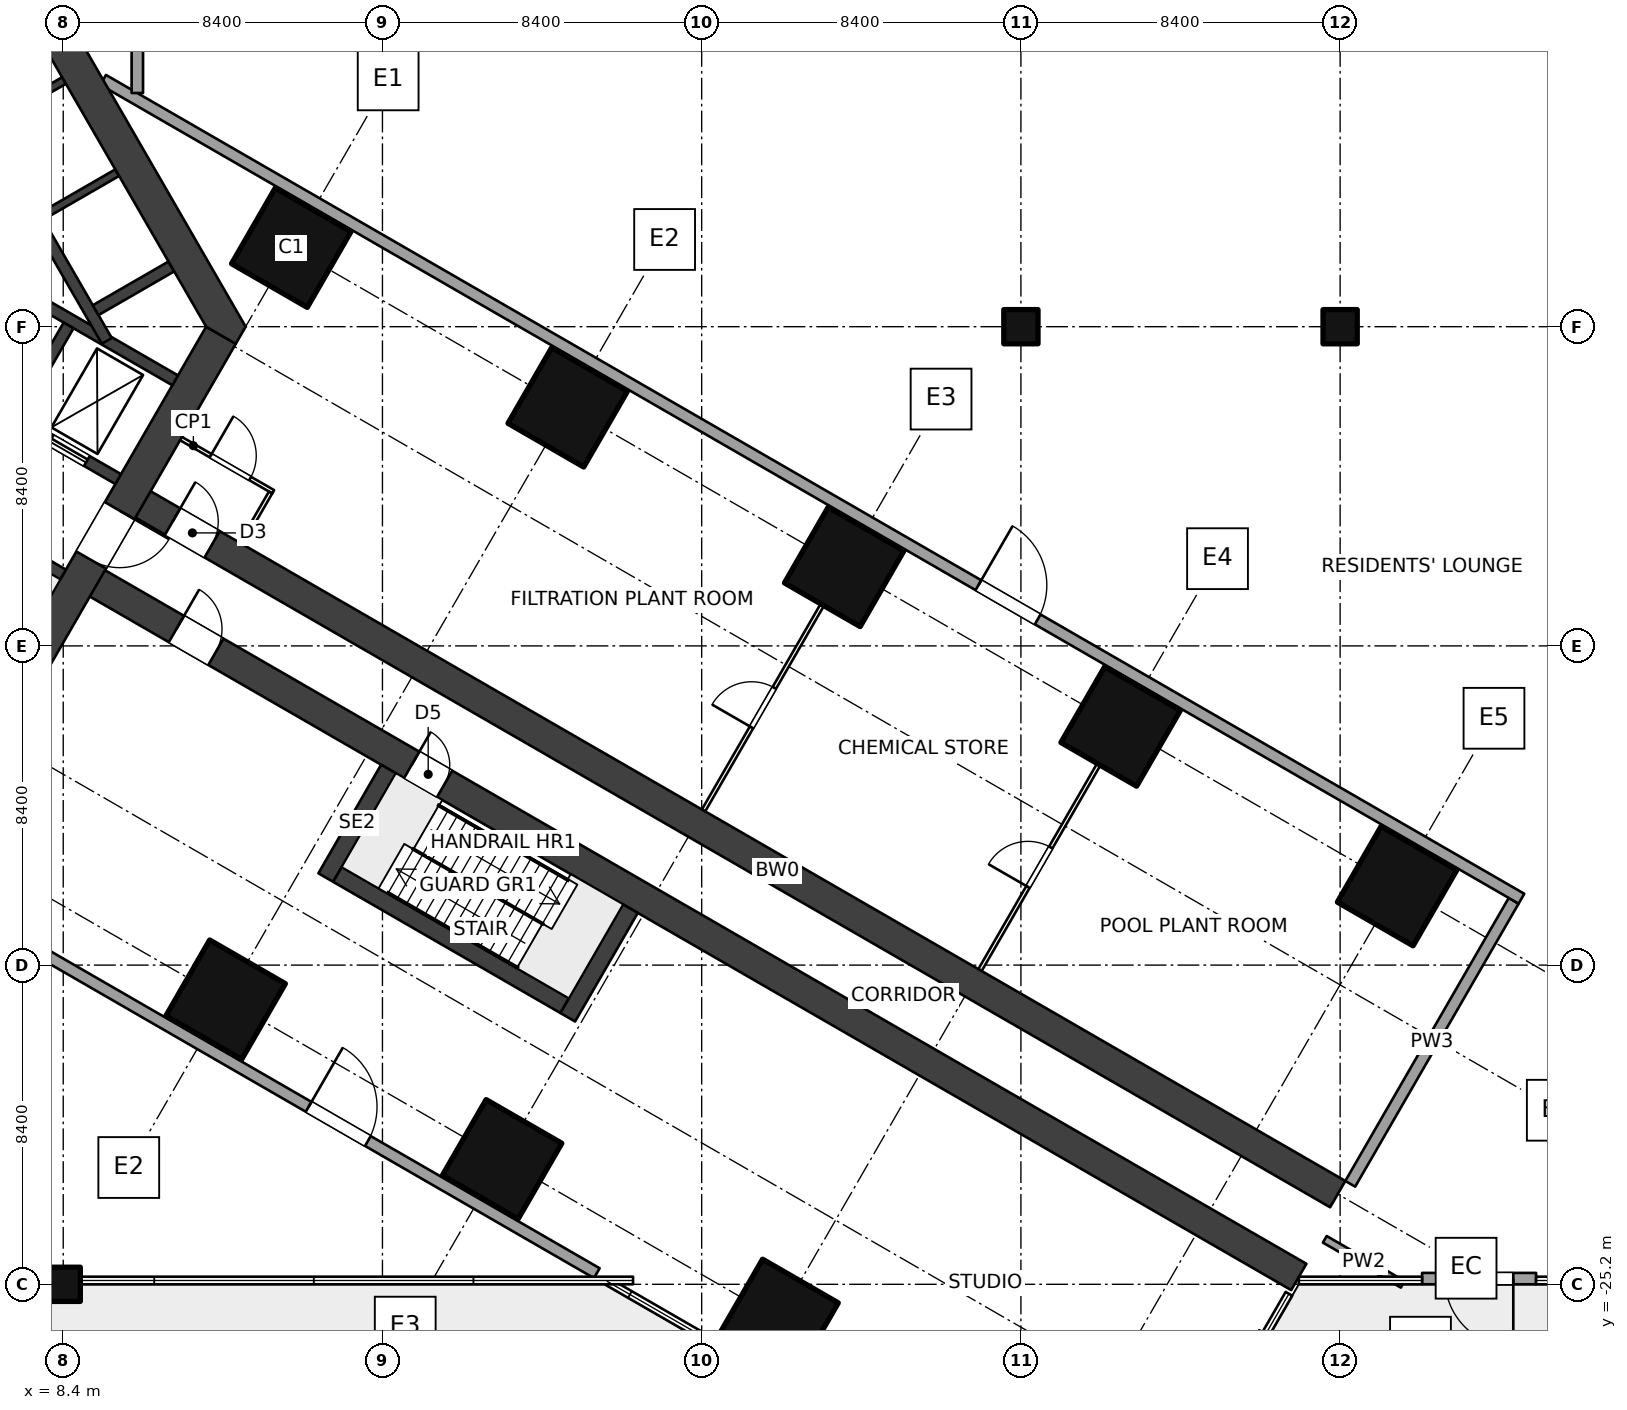
"""IFC4 building model, lengths in metres.
Left out: names, types, materials, properties, quantities, classifications, styles, units other than length and angle.
Written with IfcOpenShell. Run it as: python <this file> out.ifc"""

import sys

from ifc_helpers import new_model, si_unit, direction, frame, frame_2d, origin, origin_2d, place, context, subcontext, project, spatial, polyline, rectangle, outline, extrude, element, fill, save


model = new_model("IFC4")
c1 = context("Model", 3, precision=1e-05, world=origin(), true_north=direction((0.0, 1.0)))
c2 = subcontext(c1, "Body", "Model", "MODEL_VIEW")
j1 = project(units=[si_unit("LENGTHUNIT", "METRE"), si_unit("PLANEANGLEUNIT", "RADIAN")], contexts=[c1])
p1 = place(None, origin())
s1 = spatial("IfcSite", under=j1, at=p1, CompositionType="ELEMENT")
p2 = place(p1, origin())
s2 = spatial("IfcBuilding", under=s1, at=p2, CompositionType="ELEMENT")
p3 = place(p2, frame((0.0, 0.0, 11.0)))
s3 = spatial("IfcBuildingStorey", under=s2, at=p3, CompositionType="ELEMENT", Elevation=11.0)
for number, where, z_axis, x_axis in (
    (1, (14.4, 2.078, 0.0), (0.0, 0.0, 1.0), (-0.5, -0.866, 0.0)),
    (2, (21.675, -2.122, 0.0), (0.0, 0.0, 1.0), (-0.5, -0.866, 0.0)),
    (3, (12.675, -17.71, 0.0), (0.0, 0.0, 1.0), (-0.5, -0.866, 0.0)),
    (4, (28.949, -6.322, 0.0), (0.0, 0.0, 1.0), (-0.5, -0.866, 0.0)),
    (5, (19.949, -21.91, 0.0), (0.0, 0.0, 1.0), (-0.5, -0.866, 0.0)),
    (6, (36.224, -10.521, 0.0), (0.0, 0.0, 1.0), (-0.5, -0.866, 0.0)),
    (7, (27.224, -26.11, 0.0), (0.0, 0.0, 1.0), (-0.5, -0.866, 0.0)),
    (8, (43.499, -14.721, 0.0), (0.0, 0.0, 1.0), (-0.5, -0.866, 0.0)),
):
    element("IfcColumn", number, at=place(p3, frame(where, z_axis=z_axis, x_axis=x_axis)), inside=s3, PredefinedType="COLUMN", context=c2, shape_type="SweptSolid", body=[
        extrude(rectangle(XDim=2.3, YDim=2.3, at=origin_2d()), origin(), (0.0, 0.0, 1.0), 5.0),
    ])
for number, where, z_axis, x_axis in (
    (9, (8.4, -25.2, 0.0), (0.0, 0.0, 1.0), (1.0, 0.0, 0.0)),
    (10, (33.6, 0.0, 0.0), (0.0, 0.0, 1.0), (1.0, 0.0, 0.0)),
    (11, (42.0, 0.0, 0.0), (0.0, 0.0, 1.0), (1.0, 0.0, 0.0)),
):
    element("IfcColumn", number, at=place(p3, frame(where, z_axis=z_axis, x_axis=x_axis)), inside=s3, PredefinedType="COLUMN", context=c2, shape_type="SweptSolid", body=[
        extrude(rectangle(XDim=0.9, YDim=0.9, at=origin_2d()), origin(), (0.0, 0.0, 1.0), 5.0),
    ])
p4 = place(p3, frame((12.551, -0.225, 0.0), z_axis=(0.0, 0.0, 1.0), x_axis=(-0.499997612506, -0.8660267822, 0.0)))
e12 = element("IfcWall", 12, at=p4, inside=s3, PredefinedType="SHEAR", context=c2, shape_type="SweptSolid", body=[
    extrude(rectangle(XDim=12.161, YDim=0.9, at=frame_2d((6.08, 0.0))), origin(), (0.0, 0.0, 1.0), 5.0),
])
p5 = place(p4, frame((5.33, 0.0, 0.0)))
e13 = element("IfcOpeningElement", 13, at=p5, cuts=e12, PredefinedType="OPENING", context=c2, shape_type="SweptSolid", body=[
    extrude(rectangle(XDim=1.5, YDim=2.1, at=frame_2d((0.75, 1.05))), frame((0.0, 0.46, 0.0), z_axis=(0.0, -1.0, 0.0), x_axis=(1.0, 0.0, 0.0)), (0.0, 0.0, 1.0), 0.92),
])
p6 = place(p3, origin())
e14 = element("IfcWall", 14, at=p6, inside=s3, PredefinedType="SHEAR", context=c2, shape_type="SweptSolid", body=[
    extrude(outline(polyline([(13.2, 0.0), (6.6, 11.432), (6.08, 11.432), (6.08, 10.531), (12.161, 0.0), (12.94, -0.45), (13.2, 0.0)])), origin(), (0.0, 0.0, 1.0), 5.0),
])
p7 = place(p3, frame((2.419, -3.071, 0.0), z_axis=(0.0, 0.0, 1.0), x_axis=(0.86602711848, -0.499997030048, 0.0)))
e15 = element("IfcWall", 15, at=p7, inside=s3, PredefinedType="SHEAR", context=c2, shape_type="SweptSolid", body=[
    extrude(rectangle(XDim=6.901, YDim=0.3, at=frame_2d((3.451, 0.0))), origin(), (0.0, 0.0, 1.0), 5.0),
])
p8 = place(p7, frame((0.25, 0.0, 0.0)))
e16 = element("IfcOpeningElement", 16, at=p8, cuts=e15, PredefinedType="OPENING", context=c2, shape_type="SweptSolid", body=[
    extrude(rectangle(XDim=1.0, YDim=2.1, at=frame_2d((0.5, 1.05))), frame((0.0, 0.16, 0.0), z_axis=(0.0, -1.0, 0.0), x_axis=(1.0, 0.0, 0.0)), (0.0, 0.0, 1.0), 0.32),
])
p9 = place(p3, frame((3.869, -0.559, 0.0), z_axis=(0.0, 0.0, 1.0), x_axis=(0.86602711848, -0.499997030048, 0.0)))
e17 = element("IfcWall", 17, at=p9, inside=s3, PredefinedType="SHEAR", context=c2, shape_type="SweptSolid", body=[
    extrude(rectangle(XDim=6.901, YDim=0.3, at=frame_2d((3.451, 0.0))), origin(), (0.0, 0.0, 1.0), 5.0),
])
p10 = place(p9, frame((4.85, 0.0, 0.0)))
e18 = element("IfcOpeningElement", 18, at=p10, cuts=e17, PredefinedType="OPENING", context=c2, shape_type="SweptSolid", body=[
    extrude(rectangle(XDim=1.1, YDim=2.1, at=frame_2d((0.55, 1.05))), frame((0.0, 0.16, 0.0), z_axis=(0.0, -1.0, 0.0), x_axis=(1.0, 0.0, 0.0)), (0.0, 0.0, 1.0), 0.32),
])
p11 = place(p3, frame((5.369, 2.039, 0.0), z_axis=(0.0, 0.0, 1.0), x_axis=(0.86602711848, -0.499997030048, 0.0)))
e19 = element("IfcWall", 19, at=p11, inside=s3, PredefinedType="SHEAR", context=c2, shape_type="SweptSolid", body=[
    extrude(rectangle(XDim=6.901, YDim=0.3, at=frame_2d((3.451, 0.0))), origin(), (0.0, 0.0, 1.0), 5.0),
])
p12 = place(p3, frame((8.541, 0.034, 0.0), z_axis=(0.0, 0.0, 1.0), x_axis=(-0.50000943426, -0.866019956843, 0.0)))
e20 = element("IfcWall", 20, at=p12, inside=s3, PredefinedType="SHEAR", context=c2, shape_type="SweptSolid", body=[
    extrude(rectangle(XDim=2.7, YDim=0.3, at=frame_2d((1.35, 0.0))), origin(), (0.0, 0.0, 1.0), 5.0),
])
p13 = place(p3, frame((4.45, 8.455, 0.0), z_axis=(0.0, 0.0, 1.0), x_axis=(0.500002290144, -0.866024081565, 0.0)))
e21 = element("IfcWall", 21, at=p13, inside=s3, PredefinedType="SHEAR", context=c2, shape_type="SweptSolid", body=[
    extrude(rectangle(XDim=10.195, YDim=0.3, at=frame_2d((5.098, 0.0))), origin(), (0.0, 0.0, 1.0), 5.0),
])
p14 = place(p3, frame((9.254, 0.435, 0.0), z_axis=(0.0, 0.0, 1.0), x_axis=(0.866007057882, 0.500031774688, 0.0)))
e22 = element("IfcWall", 22, at=p14, inside=s3, PredefinedType="SHEAR", context=c2, shape_type="SweptSolid", body=[
    extrude(rectangle(XDim=2.3, YDim=0.3, at=frame_2d((1.15, 0.0))), origin(), (0.0, 0.0, 1.0), 5.0),
])
for number, where, z_axis, x_axis in (
    (23, (6.429, 5.328, 0.0), (0.0, 0.0, 1.0), (0.866, 0.5, 0.0)),
    (24, (7.829, 2.903, 0.0), (0.0, 0.0, 1.0), (0.866, 0.5, 0.0)),
):
    element("IfcWall", number, at=place(p3, frame(where, z_axis=z_axis, x_axis=x_axis)), inside=s3, PredefinedType="SHEAR", context=c2, shape_type="SweptSolid", body=[
        extrude(rectangle(XDim=2.3, YDim=0.2, at=frame_2d((1.15, 0.0))), origin(), (0.0, 0.0, 1.0), 5.0),
    ])
p15 = place(p3, frame((10.11, -4.451, 0.0), z_axis=(0.0, 0.0, 1.0), x_axis=(0.866025284237, -0.500000207062, 0.0)))
e25 = element("IfcWall", 25, at=p15, inside=s3, PredefinedType="SHEAR", context=c2, shape_type="SweptSolid", body=[
    extrude(rectangle(XDim=36.75, YDim=0.8, at=frame_2d((18.375, 0.0))), origin(), (0.0, 0.0, 1.0), 5.0),
])
p16 = place(p15, frame((1.35, 0.0, 0.0)))
e26 = element("IfcOpeningElement", 26, at=p16, cuts=e25, PredefinedType="OPENING", context=c2, shape_type="SweptSolid", body=[
    extrude(rectangle(XDim=1.2, YDim=2.1, at=frame_2d((0.6, 1.05))), frame((0.0, 0.41, 0.0), z_axis=(0.0, -1.0, 0.0), x_axis=(1.0, 0.0, 0.0)), (0.0, 0.0, 1.0), 0.82),
])
p17 = place(p3, frame((8.91, -6.53, 0.0), z_axis=(0.0, 0.0, 1.0), x_axis=(0.866024404313, -0.500001731131, 0.0)))
e27 = element("IfcWall", 27, at=p17, inside=s3, PredefinedType="SHEAR", context=c2, shape_type="SweptSolid", body=[
    extrude(rectangle(XDim=36.953, YDim=0.8, at=frame_2d((18.477, 0.0))), origin(), (0.0, 0.0, 1.0), 5.0),
])
p18 = place(p17, frame((10.0, 0.0, 0.0)))
e28 = element("IfcOpeningElement", 28, at=p18, cuts=e27, PredefinedType="OPENING", context=c2, shape_type="SweptSolid", body=[
    extrude(rectangle(XDim=1.0, YDim=2.1, at=frame_2d((0.5, 1.05))), frame((0.0, 0.41, 0.0), z_axis=(0.0, -1.0, 0.0), x_axis=(1.0, 0.0, 0.0)), (0.0, 0.0, 1.0), 0.82),
])
p19 = place(p17, frame((2.85, 0.0, 0.0)))
e29 = element("IfcOpeningElement", 29, at=p19, cuts=e27, PredefinedType="OPENING", context=c2, shape_type="SweptSolid", body=[
    extrude(rectangle(XDim=1.2, YDim=2.1, at=frame_2d((0.6, 1.05))), frame((0.0, 0.41, 0.0), z_axis=(0.0, -1.0, 0.0), x_axis=(1.0, 0.0, 0.0)), (0.0, 0.0, 1.0), 0.82),
])
p20 = place(p3, frame((47.156, -25.05, 0.0), z_axis=(0.0, 0.0, 1.0), x_axis=(-1.0, 0.0, 0.0)))
e30 = element("IfcWall", 30, at=p20, inside=s3, PredefinedType="SOLIDWALL", context=c2, shape_type="SweptSolid", body=[
    extrude(rectangle(XDim=3.0, YDim=0.3, at=frame_2d((1.5, 0.0))), origin(), (0.0, 0.0, 1.0), 4.7),
])
p21 = place(p20, frame((0.6, 0.0, 0.0)))
e31 = element("IfcOpeningElement", 31, at=p21, cuts=e30, PredefinedType="OPENING", context=c2, shape_type="SweptSolid", body=[
    extrude(rectangle(XDim=1.8, YDim=2.4, at=frame_2d((0.9, 1.2))), frame((0.0, 0.16, 0.0), z_axis=(0.0, -1.0, 0.0), x_axis=(1.0, 0.0, 0.0)), (0.0, 0.0, 1.0), 0.32),
])
p22 = place(p3, frame((11.5, -2.945, 0.0), z_axis=(0.0, 0.0, 1.0), x_axis=(0.866034573852, -0.49998411664, 0.0)))
e32 = element("IfcWall", 32, at=p22, inside=s3, PredefinedType="PARTITIONING", context=c2, shape_type="SweptSolid", body=[
    extrude(rectangle(XDim=2.8, YDim=0.1, at=frame_2d((1.4, 0.0))), origin(), (0.0, 0.0, 1.0), 4.7),
])
p23 = place(p22, frame((0.9, 0.0, 0.0)))
e33 = element("IfcOpeningElement", 33, at=p23, cuts=e32, PredefinedType="OPENING", context=c2, shape_type="SweptSolid", body=[
    extrude(rectangle(XDim=1.2, YDim=2.1, at=frame_2d((0.6, 1.05))), frame((0.0, 0.06, 0.0), z_axis=(0.0, -1.0, 0.0), x_axis=(1.0, 0.0, 0.0)), (0.0, 0.0, 1.0), 0.12),
])
p24 = place(p3, frame((13.082, -5.705, 0.0), z_axis=(0.0, 0.0, 1.0), x_axis=(0.500086022567, 0.865975732936, 0.0)))
e34 = element("IfcWall", 34, at=p24, inside=s3, PredefinedType="PARTITIONING", context=c2, shape_type="SweptSolid", body=[
    extrude(rectangle(XDim=1.55, YDim=0.1, at=frame_2d((0.775, 0.0))), origin(), (0.0, 0.0, 1.0), 4.7),
])
p25 = place(p3, frame((25.249, -12.73, 0.0), z_axis=(0.0, 0.0, 1.0), x_axis=(0.499987320047, 0.866032724435, 0.0)))
e35 = element("IfcWall", 35, at=p25, inside=s3, PredefinedType="PARTITIONING", context=c2, shape_type="SweptSolid", body=[
    extrude(rectangle(XDim=6.25, YDim=0.1, at=frame_2d((3.125, 0.0))), origin(), (0.0, 0.0, 1.0), 2.9),
])
p26 = place(p25, frame((2.525, 0.0, 0.0)))
e36 = element("IfcOpeningElement", 36, at=p26, cuts=e35, PredefinedType="OPENING", context=c2, shape_type="SweptSolid", body=[
    extrude(rectangle(XDim=1.2, YDim=2.1, at=frame_2d((0.6, 1.05))), frame((0.0, 0.06, 0.0), z_axis=(0.0, -1.0, 0.0), x_axis=(1.0, 0.0, 0.0)), (0.0, 0.0, 1.0), 0.12),
])
p27 = place(p3, frame((32.524, -16.93, 0.0), z_axis=(0.0, 0.0, 1.0), x_axis=(0.500004234368, 0.866022959057, 0.0)))
e37 = element("IfcWall", 37, at=p27, inside=s3, PredefinedType="PARTITIONING", context=c2, shape_type="SweptSolid", body=[
    extrude(rectangle(XDim=6.25, YDim=0.1, at=frame_2d((3.125, 0.0))), origin(), (0.0, 0.0, 1.0), 2.9),
])
p28 = place(p27, frame((2.525, 0.0, 0.0)))
e38 = element("IfcOpeningElement", 38, at=p28, cuts=e37, PredefinedType="OPENING", context=c2, shape_type="SweptSolid", body=[
    extrude(rectangle(XDim=1.2, YDim=2.1, at=frame_2d((0.6, 1.05))), frame((0.0, 0.06, 0.0), z_axis=(0.0, -1.0, 0.0), x_axis=(1.0, 0.0, 0.0)), (0.0, 0.0, 1.0), 0.12),
])
p29 = place(p3, frame((41.596, -24.016, 0.0), z_axis=(0.0, 0.0, 1.0), x_axis=(0.866065436262, -0.499930655304, 0.0)))
e39 = element("IfcWall", 39, at=p29, inside=s3, PredefinedType="SOLIDWALL", context=c2, shape_type="SweptSolid", body=[
    extrude(rectangle(XDim=2.368, YDim=0.2, at=frame_2d((1.184, 0.0))), origin(), (0.0, 0.0, 1.0), 4.7),
])
p30 = place(p3, frame((42.267, -22.555, 0.0), z_axis=(0.0, 0.0, 1.0), x_axis=(0.500007509209, 0.866021068297, 0.0)))
e40 = element("IfcWall", 40, at=p30, inside=s3, PredefinedType="SOLIDWALL", context=c2, shape_type="SweptSolid", body=[
    extrude(rectangle(XDim=8.6, YDim=0.3, at=frame_2d((4.3, 0.0))), origin(), (0.0, 0.0, 1.0), 3.1),
])
p31 = place(p3, frame((10.35, 6.149, 0.0), z_axis=(0.0, 0.0, 1.0), x_axis=(0.0, 1.0, 0.0)))
e41 = element("IfcWall", 41, at=p31, inside=s3, PredefinedType="SOLIDWALL", context=c2, shape_type="SweptSolid", body=[
    extrude(rectangle(XDim=41.883, YDim=0.3, at=frame_2d((20.941, 0.0))), origin(), (0.0, 0.0, 1.0), 4.7),
])
p32 = place(p31, frame((25.383, 0.0, 0.0)))
e42 = element("IfcOpeningElement", 42, at=p32, cuts=e41, PredefinedType="OPENING", context=c2, shape_type="SweptSolid", body=[
    extrude(rectangle(XDim=1.8, YDim=2.4, at=frame_2d((0.9, 1.2))), frame((0.0, 0.16, 0.0), z_axis=(0.0, -1.0, 0.0), x_axis=(1.0, 0.0, 0.0)), (0.0, 0.0, 1.0), 0.32),
])
p33 = place(p3, frame((9.45, 6.495, 0.0), z_axis=(0.0, 0.0, 1.0), x_axis=(0.866025301493, -0.500000177174, 0.0)))
e43 = element("IfcWall", 43, at=p33, inside=s3, PredefinedType="SOLIDWALL", context=c2, shape_type="SweptSolid", body=[
    extrude(rectangle(XDim=43.095, YDim=0.3, at=frame_2d((21.548, 0.0))), origin(), (0.0, 0.0, 1.0), 4.7),
])
p34 = place(p33, frame((26.595, 0.0, 0.0)))
e44 = element("IfcOpeningElement", 44, at=p34, cuts=e43, PredefinedType="OPENING", context=c2, shape_type="SweptSolid", body=[
    extrude(rectangle(XDim=1.8, YDim=2.4, at=frame_2d((0.9, 1.2))), frame((0.0, 0.16, 0.0), z_axis=(0.0, -1.0, 0.0), x_axis=(1.0, 0.0, 0.0)), (0.0, 0.0, 1.0), 0.32),
])
p35 = place(p3, frame((-0.9, -11.432, 0.0), z_axis=(0.0, 0.0, 1.0), x_axis=(0.866028700395, -0.49999429006, 0.0)))
e45 = element("IfcWall", 45, at=p35, inside=s3, PredefinedType="SOLIDWALL", context=c2, shape_type="SweptSolid", body=[
    extrude(rectangle(XDim=26.951, YDim=0.3, at=frame_2d((13.476, 0.0))), origin(), (0.0, 0.0, 1.0), 4.7),
])
p36 = place(p35, frame((18.195, 0.0, 0.0)))
e46 = element("IfcOpeningElement", 46, at=p36, cuts=e45, PredefinedType="OPENING", context=c2, shape_type="SweptSolid", body=[
    extrude(rectangle(XDim=1.8, YDim=2.4, at=frame_2d((0.9, 1.2))), frame((0.0, 0.16, 0.0), z_axis=(0.0, -1.0, 0.0), x_axis=(1.0, 0.0, 0.0)), (0.0, 0.0, 1.0), 0.32),
])
for number, where, z_axis, x_axis in (
    (47, (16.959, -11.639, 0.0), (0.0, 0.0, 1.0), (-0.5, -0.866, 0.0)),
    (48, (23.324, -15.314, 0.0), (0.0, 0.0, 1.0), (-0.5, -0.866, 0.0)),
):
    element("IfcWall", number, at=place(p3, frame(where, z_axis=z_axis, x_axis=x_axis)), inside=s3, PredefinedType="SOLIDWALL", context=c2, shape_type="SweptSolid", body=[
        extrude(rectangle(XDim=3.3, YDim=0.45, at=frame_2d((1.65, 0.0))), origin(), (0.0, 0.0, 1.0), 5.0),
    ])
p37 = place(p3, frame((15.616, -14.415, 0.0), z_axis=(0.0, 0.0, 1.0), x_axis=(0.866028853923, -0.499994024137, 0.0)))
e49 = element("IfcWall", 49, at=p37, inside=s3, PredefinedType="SOLIDWALL", context=c2, shape_type="SweptSolid", body=[
    extrude(rectangle(XDim=6.9, YDim=0.45, at=frame_2d((3.45, 0.0))), origin(), (0.0, 0.0, 1.0), 5.0),
])
p38 = place(p21, origin())
e50 = element("IfcDoor", 50, at=p38, inside=s3, OperationType="DOUBLE_DOOR_SINGLE_SWING", PredefinedType="DOOR", context=c2, shape_type="SweptSolid", body=[
    extrude(rectangle(XDim=1.8, YDim=2.4, at=frame_2d((0.9, 1.2))), frame((0.0, 0.025, 0.0), z_axis=(0.0, -1.0, 0.0), x_axis=(1.0, 0.0, 0.0)), (0.0, 0.0, 1.0), 0.05),
])
fill(e31, e50)
p39 = place(p10, origin())
e51 = element("IfcDoor", 51, at=p39, inside=s3, OperationType="DOUBLE_DOOR_SLIDING", PredefinedType="DOOR", context=c2, shape_type="SweptSolid", body=[
    extrude(rectangle(XDim=1.1, YDim=2.1, at=frame_2d((0.55, 1.05))), frame((0.0, 0.025, 0.0), z_axis=(0.0, -1.0, 0.0), x_axis=(1.0, 0.0, 0.0)), (0.0, 0.0, 1.0), 0.05),
])
fill(e18, e51)
p40 = place(p5, origin())
e52 = element("IfcDoor", 52, at=p40, inside=s3, OperationType="DOUBLE_DOOR_DOUBLE_SWING", PredefinedType="DOOR", context=c2, shape_type="SweptSolid", body=[
    extrude(rectangle(XDim=1.5, YDim=2.1, at=frame_2d((0.75, 1.05))), frame((0.0, 0.025, 0.0), z_axis=(0.0, -1.0, 0.0), x_axis=(1.0, 0.0, 0.0)), (0.0, 0.0, 1.0), 0.05),
])
fill(e13, e52)
p41 = place(p18, origin())
e53 = element("IfcDoor", 53, at=p41, inside=s3, OperationType="SINGLE_SWING_LEFT", PredefinedType="DOOR", context=c2, shape_type="SweptSolid", body=[
    extrude(rectangle(XDim=1.0, YDim=2.1, at=frame_2d((0.5, 1.05))), frame((0.0, 0.025, 0.0), z_axis=(0.0, -1.0, 0.0), x_axis=(1.0, 0.0, 0.0)), (0.0, 0.0, 1.0), 0.05),
])
fill(e28, e53)
p42 = place(p16, origin())
e54 = element("IfcDoor", 54, at=p42, inside=s3, OperationType="DOUBLE_SWING_LEFT", PredefinedType="DOOR", context=c2, shape_type="SweptSolid", body=[
    extrude(rectangle(XDim=1.2, YDim=2.1, at=frame_2d((0.6, 1.05))), frame((0.0, 0.025, 0.0), z_axis=(0.0, -1.0, 0.0), x_axis=(1.0, 0.0, 0.0)), (0.0, 0.0, 1.0), 0.05),
])
fill(e26, e54)
p43 = place(p26, origin())
e55 = element("IfcDoor", 55, at=p43, inside=s3, OperationType="DOUBLE_SWING_LEFT", PredefinedType="DOOR", context=c2, shape_type="SweptSolid", body=[
    extrude(rectangle(XDim=1.2, YDim=2.1, at=frame_2d((0.6, 1.05))), frame((0.0, 0.025, 0.0), z_axis=(0.0, -1.0, 0.0), x_axis=(1.0, 0.0, 0.0)), (0.0, 0.0, 1.0), 0.05),
])
fill(e36, e55)
p44 = place(p28, origin())
e56 = element("IfcDoor", 56, at=p44, inside=s3, OperationType="DOUBLE_SWING_LEFT", PredefinedType="DOOR", context=c2, shape_type="SweptSolid", body=[
    extrude(rectangle(XDim=1.2, YDim=2.1, at=frame_2d((0.6, 1.05))), frame((0.0, 0.025, 0.0), z_axis=(0.0, -1.0, 0.0), x_axis=(1.0, 0.0, 0.0)), (0.0, 0.0, 1.0), 0.05),
])
fill(e38, e56)
p45 = place(p23, origin())
e57 = element("IfcDoor", 57, at=p45, inside=s3, OperationType="DOUBLE_SWING_LEFT", PredefinedType="DOOR", context=c2, shape_type="SweptSolid", body=[
    extrude(rectangle(XDim=1.2, YDim=2.1, at=frame_2d((0.6, 1.05))), frame((0.0, 0.025, 0.0), z_axis=(0.0, -1.0, 0.0), x_axis=(1.0, 0.0, 0.0)), (0.0, 0.0, 1.0), 0.05),
])
fill(e33, e57)
p46 = place(p19, origin())
e58 = element("IfcDoor", 58, at=p46, inside=s3, OperationType="DOUBLE_SWING_LEFT", PredefinedType="DOOR", context=c2, shape_type="SweptSolid", body=[
    extrude(rectangle(XDim=1.2, YDim=2.1, at=frame_2d((0.6, 1.05))), frame((0.0, 0.025, 0.0), z_axis=(0.0, -1.0, 0.0), x_axis=(1.0, 0.0, 0.0)), (0.0, 0.0, 1.0), 0.05),
])
fill(e29, e58)
p47 = place(p34, origin())
e59 = element("IfcDoor", 59, at=p47, inside=s3, OperationType="DOUBLE_DOOR_DOUBLE_SWING", PredefinedType="DOOR", context=c2, shape_type="SweptSolid", body=[
    extrude(rectangle(XDim=1.8, YDim=2.4, at=frame_2d((0.9, 1.2))), frame((0.0, 0.025, 0.0), z_axis=(0.0, -1.0, 0.0), x_axis=(1.0, 0.0, 0.0)), (0.0, 0.0, 1.0), 0.05),
])
fill(e44, e59)
p48 = place(p36, origin())
e60 = element("IfcDoor", 60, at=p48, inside=s3, OperationType="DOUBLE_DOOR_DOUBLE_SWING", PredefinedType="DOOR", context=c2, shape_type="SweptSolid", body=[
    extrude(rectangle(XDim=1.8, YDim=2.4, at=frame_2d((0.9, 1.2))), frame((0.0, 0.025, 0.0), z_axis=(0.0, -1.0, 0.0), x_axis=(1.0, 0.0, 0.0)), (0.0, 0.0, 1.0), 0.05),
])
fill(e46, e60)
save(model, sys.argv[1])
